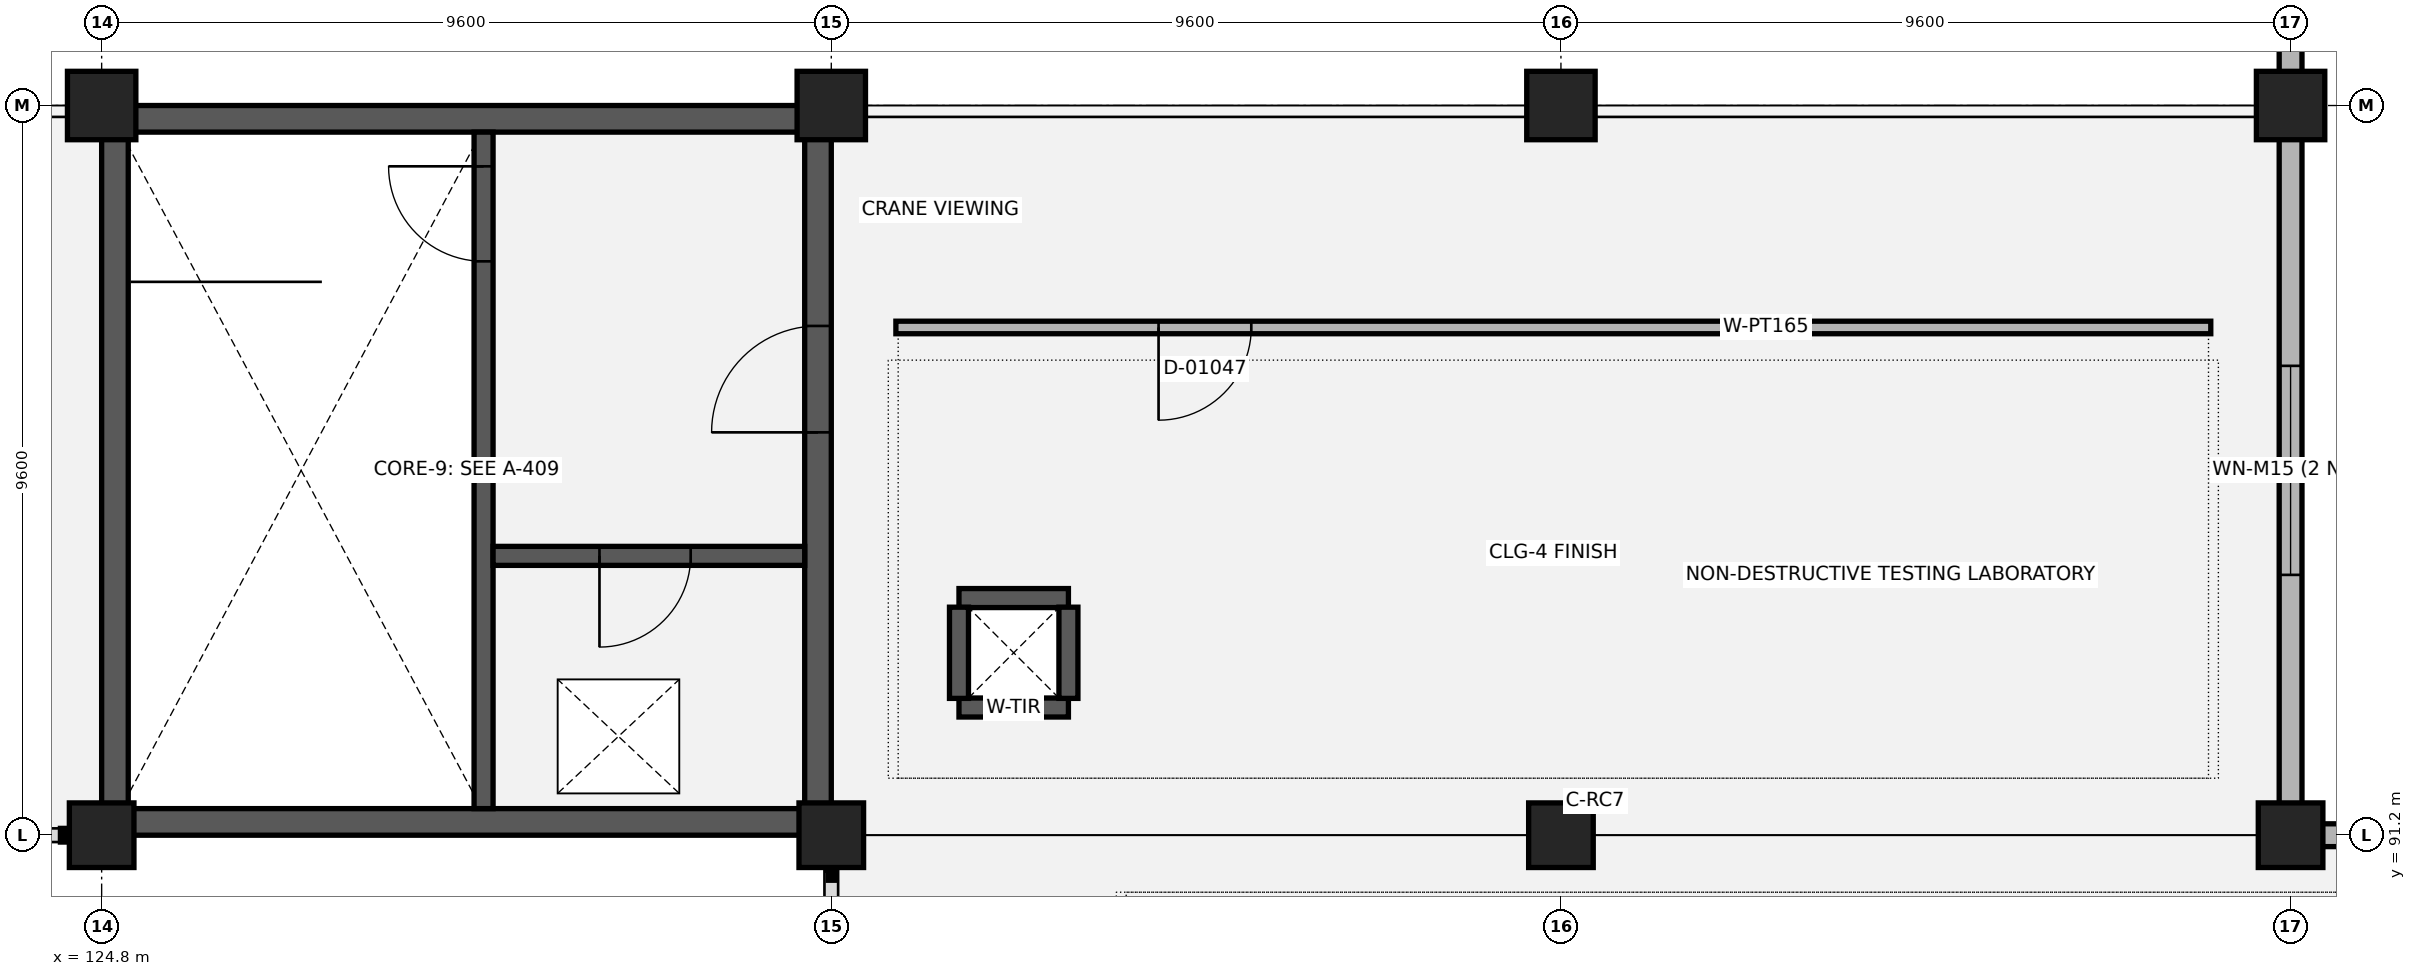
"""IFC4 building model, lengths in metres.
Left out: names, types, materials, properties, quantities, classifications, styles, units other than length and angle.
Written with IfcOpenShell. Run it as: python <this file> out.ifc"""

import sys

from ifc_helpers import new_model, si_unit, direction, frame, frame_2d, origin, origin_2d, place, context, subcontext, project, spatial, rectangle, extrude, element, fill, save


model = new_model("IFC4")
c1 = context("Model", 3, precision=1e-05, world=origin(), true_north=direction((0.0, 1.0)))
c2 = subcontext(c1, "Body", "Model", "MODEL_VIEW")
j1 = project(units=[si_unit("LENGTHUNIT", "METRE"), si_unit("PLANEANGLEUNIT", "RADIAN")], contexts=[c1])
p1 = place(None, origin())
s1 = spatial("IfcSite", under=j1, at=p1, CompositionType="ELEMENT")
p2 = place(p1, origin())
s2 = spatial("IfcBuilding", under=s1, at=p2, CompositionType="ELEMENT")
p3 = place(p2, frame((0.0, 0.0, 5.4)))
s3 = spatial("IfcBuildingStorey", under=s2, at=p3, CompositionType="ELEMENT", Elevation=5.4)
p4 = place(p3, frame((124.8, 91.2, 0.0), z_axis=(0.0, 0.0, 1.0), x_axis=(1.0, 0.0, 0.0)))
e1 = element("IfcColumn", 1, at=p4, inside=s3, PredefinedType="COLUMN", context=c2, shape_type="SweptSolid", body=[
    extrude(rectangle(XDim=0.85, YDim=0.85, at=origin_2d()), origin(), (0.0, 0.0, 1.0), 4.8),
])
p5 = place(p3, frame((124.8, 100.8, 0.0), z_axis=(0.0, 0.0, 1.0), x_axis=(1.0, 0.0, 0.0)))
e2 = element("IfcColumn", 2, at=p5, inside=s3, PredefinedType="COLUMN", context=c2, shape_type="SweptSolid", body=[
    extrude(rectangle(XDim=0.9, YDim=0.9, at=origin_2d()), origin(), (0.0, 0.0, 1.0), 4.8),
])
p6 = place(p3, frame((134.4, 91.2, 0.0), z_axis=(0.0, 0.0, 1.0), x_axis=(1.0, 0.0, 0.0)))
e3 = element("IfcColumn", 3, at=p6, inside=s3, PredefinedType="COLUMN", context=c2, shape_type="SweptSolid", body=[
    extrude(rectangle(XDim=0.85, YDim=0.85, at=origin_2d()), origin(), (0.0, 0.0, 1.0), 4.8),
])
p7 = place(p3, frame((134.4, 100.8, 0.0), z_axis=(0.0, 0.0, 1.0), x_axis=(1.0, 0.0, 0.0)))
e4 = element("IfcColumn", 4, at=p7, inside=s3, PredefinedType="COLUMN", context=c2, shape_type="SweptSolid", body=[
    extrude(rectangle(XDim=0.9, YDim=0.9, at=origin_2d()), origin(), (0.0, 0.0, 1.0), 4.8),
])
p8 = place(p3, frame((144.0, 91.2, 0.0), z_axis=(0.0, 0.0, 1.0), x_axis=(1.0, 0.0, 0.0)))
e5 = element("IfcColumn", 5, at=p8, inside=s3, PredefinedType="COLUMN", context=c2, shape_type="SweptSolid", body=[
    extrude(rectangle(XDim=0.85, YDim=0.85, at=origin_2d()), origin(), (0.0, 0.0, 1.0), 4.8),
])
p9 = place(p3, frame((144.0, 100.8, 0.0), z_axis=(0.0, 0.0, 1.0), x_axis=(1.0, 0.0, 0.0)))
e6 = element("IfcColumn", 6, at=p9, inside=s3, PredefinedType="COLUMN", context=c2, shape_type="SweptSolid", body=[
    extrude(rectangle(XDim=0.9, YDim=0.9, at=origin_2d()), origin(), (0.0, 0.0, 1.0), 4.8),
])
p10 = place(p3, frame((153.6, 91.2, 0.0), z_axis=(0.0, 0.0, 1.0), x_axis=(1.0, 0.0, 0.0)))
e7 = element("IfcColumn", 7, at=p10, inside=s3, PredefinedType="COLUMN", context=c2, shape_type="SweptSolid", body=[
    extrude(rectangle(XDim=0.85, YDim=0.85, at=origin_2d()), origin(), (0.0, 0.0, 1.0), 4.8),
])
p11 = place(p3, frame((153.6, 100.8, 0.0), z_axis=(0.0, 0.0, 1.0), x_axis=(1.0, 0.0, 0.0)))
e8 = element("IfcColumn", 8, at=p11, inside=s3, PredefinedType="COLUMN", context=c2, shape_type="SweptSolid", body=[
    extrude(rectangle(XDim=0.9, YDim=0.9, at=origin_2d()), origin(), (0.0, 0.0, 1.0), 4.8),
])
for number, where, z_axis, x_axis in (
    (9, (136.08, 92.88, 0.0), (0.0, 0.0, 1.0), (1.0, 0.0, 0.0)),
    (10, (136.08, 94.32, 0.0), (0.0, 0.0, 1.0), (1.0, 0.0, 0.0)),
):
    element("IfcWall", number, at=place(p3, frame(where, z_axis=z_axis, x_axis=x_axis)), inside=s3, PredefinedType="SHEAR", context=c2, shape_type="SweptSolid", body=[
        extrude(rectangle(XDim=1.44, YDim=0.25, at=frame_2d((0.72, 0.0))), origin(), (0.0, 0.0, 1.0), 3.6),
    ])
for number, where, z_axis, x_axis in (
    (11, (136.08, 93.0, 0.0), (0.0, 0.0, 1.0), (0.0, 1.0, 0.0)),
    (12, (137.52, 93.0, 0.0), (0.0, 0.0, 1.0), (0.0, 1.0, 0.0)),
):
    element("IfcWall", number, at=place(p3, frame(where, z_axis=z_axis, x_axis=x_axis)), inside=s3, PredefinedType="SHEAR", context=c2, shape_type="SweptSolid", body=[
        extrude(rectangle(XDim=1.2, YDim=0.25, at=frame_2d((0.6, 0.0))), origin(), (0.0, 0.0, 1.0), 3.6),
    ])
p12 = place(p3, frame((153.6, 91.58, 0.0), z_axis=(0.0, 0.0, 1.0), x_axis=(0.0, 1.0, 0.0)))
e13 = element("IfcWall", 13, at=p12, inside=s3, PredefinedType="SOLIDWALL", context=c2, shape_type="SweptSolid", body=[
    extrude(rectangle(XDim=8.84, YDim=0.3, at=frame_2d((4.42, 0.0))), origin(), (0.0, 0.0, 1.0), 4.4),
])
p13 = place(p12, frame((3.045, 0.0, 0.9)))
e14 = element("IfcOpeningElement", 14, at=p13, cuts=e13, PredefinedType="OPENING", context=c2, shape_type="SweptSolid", body=[
    extrude(rectangle(XDim=2.75, YDim=1.8, at=frame_2d((1.375, 0.9))), frame((0.0, 0.16, 0.0), z_axis=(0.0, -1.0, 0.0), x_axis=(1.0, 0.0, 0.0)), (0.0, 0.0, 1.0), 0.32),
])
p14 = place(p3, frame((153.6, 101.18, 0.0), z_axis=(0.0, 0.0, 1.0), x_axis=(0.0, 1.0, 0.0)))
e15 = element("IfcWall", 15, at=p14, inside=s3, PredefinedType="SOLIDWALL", context=c2, shape_type="SweptSolid", body=[
    extrude(rectangle(XDim=18.44, YDim=0.3, at=frame_2d((9.22, 0.0))), origin(), (0.0, 0.0, 1.0), 4.4),
])
p15 = place(p14, frame((7.845, 0.0, 0.9)))
e16 = element("IfcOpeningElement", 16, at=p15, cuts=e15, PredefinedType="OPENING", context=c2, shape_type="SweptSolid", body=[
    extrude(rectangle(XDim=2.75, YDim=1.8, at=frame_2d((1.375, 0.9))), frame((0.0, 0.16, 0.0), z_axis=(0.0, -1.0, 0.0), x_axis=(1.0, 0.0, 0.0)), (0.0, 0.0, 1.0), 0.32),
])
p16 = place(p3, frame((153.98, 91.2, 0.0), z_axis=(0.0, 0.0, 1.0), x_axis=(1.0, 0.0, 0.0)))
e17 = element("IfcWall", 17, at=p16, inside=s3, PredefinedType="SOLIDWALL", context=c2, shape_type="SweptSolid", body=[
    extrude(rectangle(XDim=8.84, YDim=0.3, at=frame_2d((4.42, 0.0))), origin(), (0.0, 0.0, 1.0), 3.28),
])
p17 = place(p16, frame((3.32, 0.0, 0.9)))
e18 = element("IfcOpeningElement", 18, at=p17, cuts=e17, PredefinedType="OPENING", context=c2, shape_type="SweptSolid", body=[
    extrude(rectangle(XDim=2.2, YDim=1.8, at=frame_2d((1.1, 0.9))), frame((0.0, 0.16, 0.0), z_axis=(0.0, -1.0, 0.0), x_axis=(1.0, 0.0, 0.0)), (0.0, 0.0, 1.0), 0.32),
])
for number, where, z_axis, x_axis in (
    (19, (124.8, 100.625, 0.0), (0.0, 0.0, 1.0), (1.0, 0.0, 0.0)),
    (20, (124.8, 91.375, 0.0), (0.0, 0.0, 1.0), (1.0, 0.0, 0.0)),
):
    element("IfcWall", number, at=place(p3, frame(where, z_axis=z_axis, x_axis=x_axis)), inside=s3, PredefinedType="SHEAR", context=c2, shape_type="SweptSolid", body=[
        extrude(rectangle(XDim=9.6, YDim=0.35, at=frame_2d((4.8, 0.0))), origin(), (0.0, 0.0, 1.0), 4.48),
    ])
p18 = place(p3, frame((124.975, 91.2, 0.0), z_axis=(0.0, 0.0, 1.0), x_axis=(0.0, 1.0, 0.0)))
e21 = element("IfcWall", 21, at=p18, inside=s3, PredefinedType="SHEAR", context=c2, shape_type="SweptSolid", body=[
    extrude(rectangle(XDim=9.6, YDim=0.35, at=frame_2d((4.8, 0.0))), origin(), (0.0, 0.0, 1.0), 4.48),
])
p19 = place(p3, frame((134.225, 91.2, 0.0), z_axis=(0.0, 0.0, 1.0), x_axis=(0.0, 1.0, 0.0)))
e22 = element("IfcWall", 22, at=p19, inside=s3, PredefinedType="SHEAR", context=c2, shape_type="SweptSolid", body=[
    extrude(rectangle(XDim=9.6, YDim=0.35, at=frame_2d((4.8, 0.0))), origin(), (0.0, 0.0, 1.0), 4.48),
])
p20 = place(p19, frame((5.3, 0.0, 0.0)))
e23 = element("IfcOpeningElement", 23, at=p20, cuts=e22, PredefinedType="OPENING", context=c2, shape_type="SweptSolid", body=[
    extrude(rectangle(XDim=1.4, YDim=2.15, at=frame_2d((0.7, 1.075))), frame((0.0, 0.185, 0.0), z_axis=(0.0, -1.0, 0.0), x_axis=(1.0, 0.0, 0.0)), (0.0, 0.0, 1.0), 0.37),
])
p21 = place(p3, frame((129.825, 100.45, 0.0), z_axis=(0.0, 0.0, 1.0), x_axis=(0.0, -1.0, 0.0)))
e24 = element("IfcWall", 24, at=p21, inside=s3, PredefinedType="SHEAR", context=c2, shape_type="SweptSolid", body=[
    extrude(rectangle(XDim=8.9, YDim=0.25, at=frame_2d((4.45, 0.0))), origin(), (0.0, 0.0, 1.0), 4.48),
])
p22 = place(p21, frame((0.45, 0.0, 0.0)))
e25 = element("IfcOpeningElement", 25, at=p22, cuts=e24, PredefinedType="OPENING", context=c2, shape_type="SweptSolid", body=[
    extrude(rectangle(XDim=1.25, YDim=2.15, at=frame_2d((0.625, 1.075))), frame((0.0, 0.135, 0.0), z_axis=(0.0, -1.0, 0.0), x_axis=(1.0, 0.0, 0.0)), (0.0, 0.0, 1.0), 0.27),
])
p23 = place(p3, frame((129.95, 94.875, 0.0), z_axis=(0.0, 0.0, 1.0), x_axis=(1.0, 0.0, 0.0)))
e26 = element("IfcWall", 26, at=p23, inside=s3, PredefinedType="SHEAR", context=c2, shape_type="SweptSolid", body=[
    extrude(rectangle(XDim=4.1, YDim=0.25, at=frame_2d((2.05, 0.0))), origin(), (0.0, 0.0, 1.0), 4.48),
])
p24 = place(p23, frame((1.4, 0.0, 0.0)))
e27 = element("IfcOpeningElement", 27, at=p24, cuts=e26, PredefinedType="OPENING", context=c2, shape_type="SweptSolid", body=[
    extrude(rectangle(XDim=1.2, YDim=2.15, at=frame_2d((0.6, 1.075))), frame((0.0, 0.135, 0.0), z_axis=(0.0, -1.0, 0.0), x_axis=(1.0, 0.0, 0.0)), (0.0, 0.0, 1.0), 0.27),
])
p25 = place(p3, frame((135.25, 97.88, 0.0), z_axis=(0.0, 0.0, 1.0), x_axis=(1.0, 0.0, 0.0)))
e28 = element("IfcWall", 28, at=p25, inside=s3, PredefinedType="PARTITIONING", context=c2, shape_type="SweptSolid", body=[
    extrude(rectangle(XDim=17.3, YDim=0.165, at=frame_2d((8.65, 0.0))), origin(), (0.0, 0.0, 1.0), 3.26),
])
p26 = place(p25, frame((3.456, 0.0, 0.0)))
e29 = element("IfcOpeningElement", 29, at=p26, cuts=e28, PredefinedType="OPENING", context=c2, shape_type="SweptSolid", body=[
    extrude(rectangle(XDim=1.22, YDim=2.15, at=frame_2d((0.61, 1.075))), frame((0.0, 0.093, 0.0), z_axis=(0.0, -1.0, 0.0), x_axis=(1.0, 0.0, 0.0)), (0.0, 0.0, 1.0), 0.185),
])
p27 = place(p13, origin())
e30 = element("IfcWindow", 30, at=p27, inside=s3, PartitioningType="SINGLE_PANEL", PredefinedType="WINDOW", context=c2, shape_type="SweptSolid", body=[
    extrude(rectangle(XDim=2.75, YDim=1.8, at=frame_2d((1.375, 0.9))), frame((0.0, 0.03, 0.0), z_axis=(0.0, -1.0, 0.0), x_axis=(1.0, 0.0, 0.0)), (0.0, 0.0, 1.0), 0.06),
])
fill(e14, e30)
p28 = place(p22, origin())
e31 = element("IfcDoor", 31, at=p28, inside=s3, OperationType="SINGLE_SWING_RIGHT", PredefinedType="DOOR", context=c2, shape_type="SweptSolid", body=[
    extrude(rectangle(XDim=1.25, YDim=2.15, at=frame_2d((0.625, 1.075))), frame((0.0, 0.025, 0.0), z_axis=(0.0, -1.0, 0.0), x_axis=(1.0, 0.0, 0.0)), (0.0, 0.0, 1.0), 0.05),
])
fill(e25, e31)
p29 = place(p24, origin())
e32 = element("IfcDoor", 32, at=p29, inside=s3, OperationType="SINGLE_SWING_RIGHT", PredefinedType="DOOR", context=c2, shape_type="SweptSolid", body=[
    extrude(rectangle(XDim=1.2, YDim=2.15, at=frame_2d((0.6, 1.075))), frame((0.0, 0.025, 0.0), z_axis=(0.0, -1.0, 0.0), x_axis=(1.0, 0.0, 0.0)), (0.0, 0.0, 1.0), 0.05),
])
fill(e27, e32)
p30 = place(p20, origin())
e33 = element("IfcDoor", 33, at=p30, inside=s3, OperationType="SINGLE_SWING_LEFT", PredefinedType="DOOR", context=c2, shape_type="SweptSolid", body=[
    extrude(rectangle(XDim=1.4, YDim=2.15, at=frame_2d((0.7, 1.075))), frame((0.0, 0.025, 0.0), z_axis=(0.0, -1.0, 0.0), x_axis=(1.0, 0.0, 0.0)), (0.0, 0.0, 1.0), 0.05),
])
fill(e23, e33)
p31 = place(p26, origin())
e34 = element("IfcDoor", 34, at=p31, inside=s3, OperationType="SINGLE_SWING_RIGHT", PredefinedType="DOOR", context=c2, shape_type="SweptSolid", body=[
    extrude(rectangle(XDim=1.22, YDim=2.15, at=frame_2d((0.61, 1.075))), frame((0.0, 0.025, 0.0), z_axis=(0.0, -1.0, 0.0), x_axis=(1.0, 0.0, 0.0)), (0.0, 0.0, 1.0), 0.05),
])
fill(e29, e34)
save(model, sys.argv[1])
